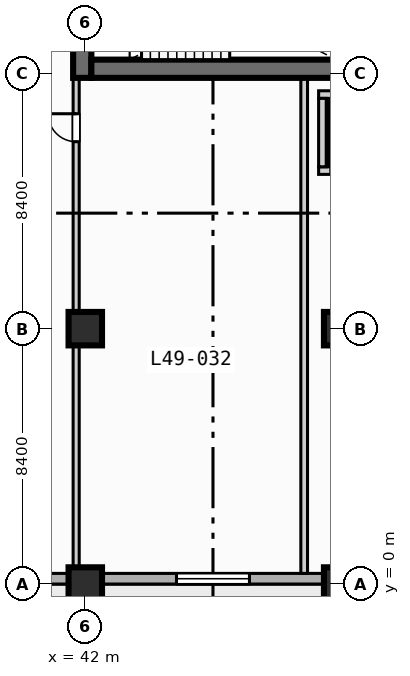
"""IFC4 building model, lengths in metres.
Left out: names, types, materials, properties, quantities, classifications, styles, units other than length and angle.
Written with IfcOpenShell. Run it as: python <this file> out.ifc"""

import sys

from ifc_helpers import new_model, si_unit, direction, frame, frame_2d, origin, origin_2d, place, context, subcontext, project, spatial, rectangle, extrude, element, fill, save


model = new_model("IFC4")
c1 = context("Model", 3, precision=1e-05, world=origin(), true_north=direction((0.0, 1.0)))
c2 = subcontext(c1, "Body", "Model", "MODEL_VIEW")
j1 = project(units=[si_unit("LENGTHUNIT", "METRE"), si_unit("PLANEANGLEUNIT", "RADIAN")], contexts=[c1])
p1 = place(None, origin())
s1 = spatial("IfcSite", under=j1, at=p1, CompositionType="ELEMENT")
p2 = place(p1, origin())
s2 = spatial("IfcBuilding", under=s1, at=p2, CompositionType="ELEMENT")
p3 = place(p2, frame((0.0, 0.0, 201.3)))
s3 = spatial("IfcBuildingStorey", under=s2, at=p3, CompositionType="ELEMENT", Elevation=201.3)
p4 = place(p3, frame((41.9, 16.65, 0.0), z_axis=(0.0, 0.0, 1.0), x_axis=(0.0, 1.0, 0.0)))
e1 = element("IfcWall", 1, at=p4, inside=s3, PredefinedType="SHEAR", context=c2, shape_type="SweptSolid", body=[
    extrude(rectangle(XDim=1.35, YDim=0.6, at=frame_2d((0.675, 0.0))), origin(), (0.0, 0.0, 1.0), 3.47),
])
p5 = place(p3, frame((42.2, 16.95, 0.0), z_axis=(0.0, 0.0, 1.0), x_axis=(1.0, 0.0, 0.0)))
e2 = element("IfcWall", 2, at=p5, inside=s3, PredefinedType="SHEAR", context=c2, shape_type="SweptSolid", body=[
    extrude(rectangle(XDim=16.35, YDim=0.6, at=frame_2d((8.175, 0.0))), origin(), (0.0, 0.0, 1.0), 3.47),
])
for number, where, z_axis, x_axis in (
    (3, (42.0, 0.0, 0.0), (0.0, 0.0, 1.0), (1.0, 0.0, 0.0)),
    (4, (42.0, 8.4, 0.0), (0.0, 0.0, 1.0), (1.0, 0.0, 0.0)),
    (5, (50.4, 0.0, 0.0), (0.0, 0.0, 1.0), (1.0, 0.0, 0.0)),
    (6, (50.4, 8.4, 0.0), (0.0, 0.0, 1.0), (1.0, 0.0, 0.0)),
):
    element("IfcColumn", number, at=place(p3, frame(where, z_axis=z_axis, x_axis=x_axis)), inside=s3, PredefinedType="COLUMN", context=c2, shape_type="SweptSolid", body=[
        extrude(rectangle(XDim=1.1, YDim=1.1, at=origin_2d()), origin(), (0.0, 0.0, 1.0), 3.7),
    ])
p6 = place(p3, frame((72.425, 0.175, 0.0), z_axis=(0.0, 0.0, 1.0), x_axis=(-1.0, 0.0, 0.0)))
e7 = element("IfcWall", 7, at=p6, inside=s3, PredefinedType="STANDARD", context=c2, shape_type="SweptSolid", body=[
    extrude(rectangle(XDim=69.25, YDim=0.35, at=frame_2d((34.625, 0.0))), origin(), (0.0, 0.0, 1.0), 3.47),
])
p7 = place(p6, frame((52.825, 0.0, 0.0)))
e8 = element("IfcOpeningElement", 8, at=p7, cuts=e7, PredefinedType="OPENING", context=c2, shape_type="SweptSolid", body=[
    extrude(rectangle(XDim=1.4, YDim=2.2, at=frame_2d((0.7, 1.1))), frame((0.0, 0.185, 0.0), z_axis=(0.0, -1.0, 0.0), x_axis=(1.0, 0.0, 0.0)), (0.0, 0.0, 1.0), 0.37),
])
p8 = place(p6, frame((41.825, 0.0, 0.85)))
e9 = element("IfcOpeningElement", 9, at=p8, cuts=e7, PredefinedType="OPENING", context=c2, shape_type="SweptSolid", body=[
    extrude(rectangle(XDim=2.4, YDim=1.95, at=frame_2d((1.2, 0.975))), frame((0.0, 0.185, 0.0), z_axis=(0.0, -1.0, 0.0), x_axis=(1.0, 0.0, 0.0)), (0.0, 0.0, 1.0), 0.37),
])
p9 = place(p6, frame((33.725, 0.0, 0.85)))
e10 = element("IfcOpeningElement", 10, at=p9, cuts=e7, PredefinedType="OPENING", context=c2, shape_type="SweptSolid", body=[
    extrude(rectangle(XDim=1.8, YDim=1.8, at=frame_2d((0.9, 0.9))), frame((0.0, 0.185, 0.0), z_axis=(0.0, -1.0, 0.0), x_axis=(1.0, 0.0, 0.0)), (0.0, 0.0, 1.0), 0.37),
])
p10 = place(p6, frame((25.025, 0.0, 0.85)))
e11 = element("IfcOpeningElement", 11, at=p10, cuts=e7, PredefinedType="OPENING", context=c2, shape_type="SweptSolid", body=[
    extrude(rectangle(XDim=2.4, YDim=1.95, at=frame_2d((1.2, 0.975))), frame((0.0, 0.185, 0.0), z_axis=(0.0, -1.0, 0.0), x_axis=(1.0, 0.0, 0.0)), (0.0, 0.0, 1.0), 0.37),
])
p11 = place(p6, frame((64.675, 0.0, 0.85)))
e12 = element("IfcOpeningElement", 12, at=p11, cuts=e7, PredefinedType="OPENING", context=c2, shape_type="SweptSolid", body=[
    extrude(rectangle(XDim=1.8, YDim=1.8, at=frame_2d((0.9, 0.9))), frame((0.0, 0.185, 0.0), z_axis=(0.0, -1.0, 0.0), x_axis=(1.0, 0.0, 0.0)), (0.0, 0.0, 1.0), 0.37),
])
p12 = place(p6, frame((50.275, 0.0, 0.85)))
e13 = element("IfcOpeningElement", 13, at=p12, cuts=e7, PredefinedType="OPENING", context=c2, shape_type="SweptSolid", body=[
    extrude(rectangle(XDim=1.8, YDim=1.8, at=frame_2d((0.9, 0.9))), frame((0.0, 0.185, 0.0), z_axis=(0.0, -1.0, 0.0), x_axis=(1.0, 0.0, 0.0)), (0.0, 0.0, 1.0), 0.37),
])
p13 = place(p3, frame((49.675, 13.6, 0.0), z_axis=(0.0, 0.0, 1.0), x_axis=(1.0, 0.0, 0.0)))
e14 = element("IfcWall", 14, at=p13, inside=s3, PredefinedType="SOLIDWALL", context=c2, shape_type="SweptSolid", body=[
    extrude(rectangle(XDim=2.25, YDim=0.25, at=frame_2d((1.125, 0.0))), origin(), (0.0, 0.0, 1.0), 3.47),
])
p14 = place(p13, frame((0.4, 0.0, 0.0)))
e15 = element("IfcOpeningElement", 15, at=p14, cuts=e14, PredefinedType="OPENING", context=c2, shape_type="SweptSolid", body=[
    extrude(rectangle(XDim=1.1, YDim=2.15, at=frame_2d((0.55, 1.075))), frame((0.0, 0.135, 0.0), z_axis=(0.0, -1.0, 0.0), x_axis=(1.0, 0.0, 0.0)), (0.0, 0.0, 1.0), 0.27),
])
for number, where, z_axis, x_axis in (
    (16, (49.675, 16.1, 0.0), (0.0, 0.0, 1.0), (1.0, 0.0, 0.0)),
    (17, (49.8, 13.725, 0.0), (0.0, 0.0, 1.0), (0.0, 1.0, 0.0)),
):
    element("IfcWall", number, at=place(p3, frame(where, z_axis=z_axis, x_axis=x_axis)), inside=s3, PredefinedType="SOLIDWALL", context=c2, shape_type="SweptSolid", body=[
        extrude(rectangle(XDim=2.25, YDim=0.25, at=frame_2d((1.125, 0.0))), origin(), (0.0, 0.0, 1.0), 3.47),
    ])
p15 = place(p3, frame((41.7, 0.35, 0.0), z_axis=(0.0, 0.0, 1.0), x_axis=(0.0, 1.0, 0.0)))
e18 = element("IfcWall", 18, at=p15, inside=s3, PredefinedType="PARTITIONING", context=c2, shape_type="SweptSolid", body=[
    extrude(rectangle(XDim=16.25, YDim=0.2, at=frame_2d((8.125, 0.0))), origin(), (0.0, 0.0, 1.0), 2.82),
])
p16 = place(p15, frame((14.2, 0.0, 0.0)))
e19 = element("IfcOpeningElement", 19, at=p16, cuts=e18, PredefinedType="OPENING", context=c2, shape_type="SweptSolid", body=[
    extrude(rectangle(XDim=0.92, YDim=2.1, at=frame_2d((0.46, 1.05))), frame((0.0, 0.11, 0.0), z_axis=(0.0, -1.0, 0.0), x_axis=(1.0, 0.0, 0.0)), (0.0, 0.0, 1.0), 0.22),
])
p17 = place(p3, frame((49.2, 0.35, 0.0), z_axis=(0.0, 0.0, 1.0), x_axis=(0.0, 1.0, 0.0)))
e20 = element("IfcWall", 20, at=p17, inside=s3, PredefinedType="PARTITIONING", context=c2, shape_type="SweptSolid", body=[
    extrude(rectangle(XDim=16.25, YDim=0.22, at=frame_2d((8.125, 0.0))), origin(), (0.0, 0.0, 1.0), 3.47),
])
p18 = place(p10, origin())
e21 = element("IfcWindow", 21, at=p18, inside=s3, PartitioningType="SINGLE_PANEL", PredefinedType="WINDOW", context=c2, shape_type="SweptSolid", body=[
    extrude(rectangle(XDim=2.4, YDim=1.95, at=frame_2d((1.2, 0.975))), frame((0.0, 0.03, 0.0), z_axis=(0.0, -1.0, 0.0), x_axis=(1.0, 0.0, 0.0)), (0.0, 0.0, 1.0), 0.06),
])
fill(e11, e21)
p19 = place(p16, origin())
e22 = element("IfcDoor", 22, at=p19, inside=s3, OperationType="SINGLE_SWING_RIGHT", PredefinedType="DOOR", context=c2, shape_type="SweptSolid", body=[
    extrude(rectangle(XDim=0.92, YDim=2.1, at=frame_2d((0.46, 1.05))), frame((0.0, 0.025, 0.0), z_axis=(0.0, -1.0, 0.0), x_axis=(1.0, 0.0, 0.0)), (0.0, 0.0, 1.0), 0.05),
])
fill(e19, e22)
save(model, sys.argv[1])
